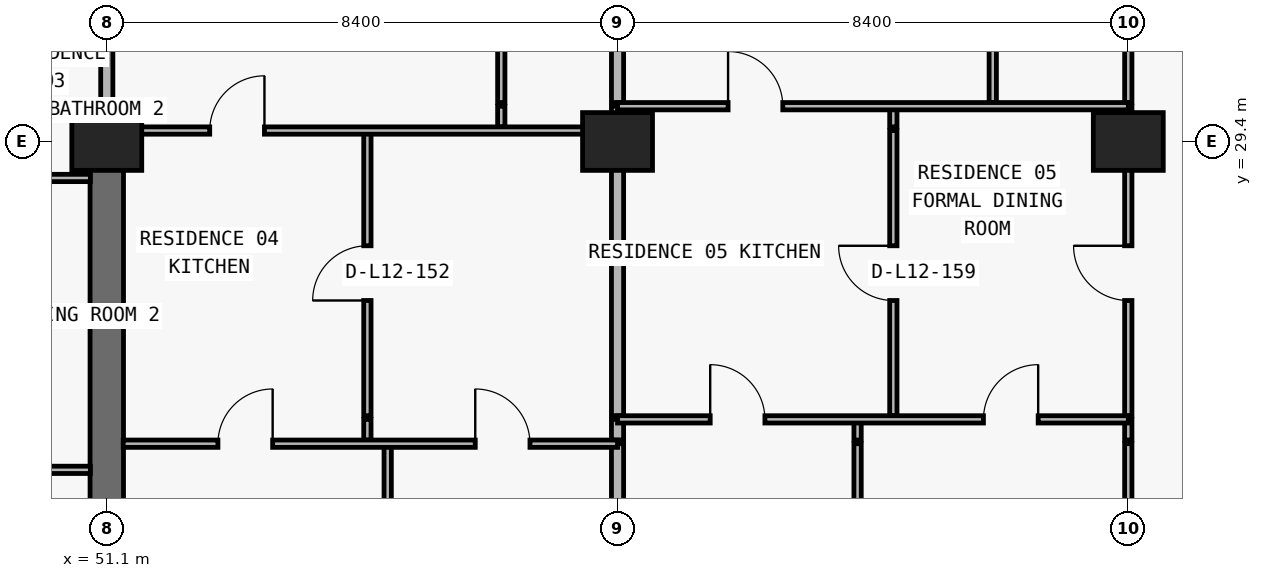
"""IFC4 building model, lengths in metres.
Left out: names, types, materials, properties, quantities, classifications, styles, units other than length and angle.
Written with IfcOpenShell. Run it as: python <this file> out.ifc"""

import sys

from ifc_helpers import new_model, si_unit, direction, frame, frame_2d, origin, origin_2d, place, context, subcontext, project, spatial, rectangle, extrude, element, fill, save


model = new_model("IFC4")
c1 = context("Model", 3, precision=1e-05, world=origin(), true_north=direction((0.0, 1.0)))
c2 = subcontext(c1, "Body", "Model", "MODEL_VIEW")
j1 = project(units=[si_unit("LENGTHUNIT", "METRE"), si_unit("PLANEANGLEUNIT", "RADIAN")], contexts=[c1])
p1 = place(None, origin())
s1 = spatial("IfcSite", under=j1, at=p1, CompositionType="ELEMENT")
p2 = place(p1, origin())
s2 = spatial("IfcBuilding", under=s1, at=p2, CompositionType="ELEMENT")
p3 = place(p2, frame((0.0, 0.0, 49.8)))
s3 = spatial("IfcBuildingStorey", under=s2, at=p3, CompositionType="ELEMENT", Elevation=49.8)
for number, where, z_axis, x_axis in (
    (1, (51.1, 29.4, 0.0), (0.0, 0.0, 1.0), (1.0, 0.0, 0.0)),
    (2, (59.5, 29.4, 0.0), (0.0, 0.0, 1.0), (1.0, 0.0, 0.0)),
    (3, (67.9, 29.4, 0.0), (0.0, 0.0, 1.0), (1.0, 0.0, 0.0)),
):
    element("IfcColumn", number, at=place(p3, frame(where, z_axis=z_axis, x_axis=x_axis)), inside=s3, PredefinedType="COLUMN", context=c2, shape_type="SweptSolid", body=[
        extrude(rectangle(XDim=1.15, YDim=0.95, at=origin_2d()), origin(), (0.0, 0.0, 1.0), 3.05),
    ])
p4 = place(p3, frame((51.1, 20.8, 0.0), z_axis=(0.0, 0.0, 1.0), x_axis=(0.0, 1.0, 0.0)))
e4 = element("IfcWall", 4, at=p4, inside=s3, PredefinedType="SHEAR", context=c2, shape_type="SweptSolid", body=[
    extrude(rectangle(XDim=8.6, YDim=0.55, at=frame_2d((4.3, 0.0))), origin(), (0.0, 0.0, 1.0), 3.05),
])
p5 = place(p3, frame((51.1, 29.64, 0.0), z_axis=(0.0, 0.0, 1.0), x_axis=(0.0, 1.0, 0.0)))
e5 = element("IfcWall", 5, at=p5, inside=s3, PredefinedType="PARTITIONING", context=c2, shape_type="SweptSolid", body=[
    extrude(rectangle(XDim=0.34, YDim=0.2, at=frame_2d((0.17, 0.0))), origin(), (0.0, 0.0, 1.0), 2.335),
])
p6 = place(p3, frame((51.1, 30.04, 0.0), z_axis=(0.0, 0.0, 1.0), x_axis=(0.0, 1.0, 0.0)))
e6 = element("IfcWall", 6, at=p6, inside=s3, PredefinedType="PARTITIONING", context=c2, shape_type="SweptSolid", body=[
    extrude(rectangle(XDim=4.56, YDim=0.2, at=frame_2d((2.28, 0.0))), origin(), (0.0, 0.0, 1.0), 2.335),
])
p7 = place(p3, frame((55.386, 24.49, 0.0), z_axis=(0.0, 0.0, 1.0), x_axis=(0.0, 1.0, 0.0)))
e7 = element("IfcWall", 7, at=p7, inside=s3, PredefinedType="PARTITIONING", context=c2, shape_type="SweptSolid", body=[
    extrude(rectangle(XDim=0.34, YDim=0.12, at=frame_2d((0.17, 0.0))), origin(), (0.0, 0.0, 1.0), 3.05),
])
p8 = place(p3, frame((55.386, 24.89, 0.0), z_axis=(0.0, 0.0, 1.0), x_axis=(0.0, 1.0, 0.0)))
e8 = element("IfcWall", 8, at=p8, inside=s3, PredefinedType="PARTITIONING", context=c2, shape_type="SweptSolid", body=[
    extrude(rectangle(XDim=4.69, YDim=0.12, at=frame_2d((2.345, 0.0))), origin(), (0.0, 0.0, 1.0), 3.05),
])
p9 = place(p8, frame((1.895, 0.0, 0.0)))
e9 = element("IfcOpeningElement", 9, at=p9, cuts=e8, PredefinedType="OPENING", context=c2, shape_type="SweptSolid", body=[
    extrude(rectangle(XDim=0.9, YDim=2.15, at=frame_2d((0.45, 1.075))), frame((0.0, 0.07, 0.0), z_axis=(0.0, -1.0, 0.0), x_axis=(1.0, 0.0, 0.0)), (0.0, 0.0, 1.0), 0.14),
])
p10 = place(p3, frame((55.72, 6.24, 0.0), z_axis=(0.0, 0.0, 1.0), x_axis=(0.0, 1.0, 0.0)))
e10 = element("IfcWall", 10, at=p10, inside=s3, PredefinedType="PARTITIONING", context=c2, shape_type="SweptSolid", body=[
    extrude(rectangle(XDim=18.19, YDim=0.12, at=frame_2d((9.095, 0.0))), origin(), (0.0, 0.0, 1.0), 3.05),
])
p11 = place(p3, frame((57.588, 29.64, 0.0), z_axis=(0.0, 0.0, 1.0), x_axis=(0.0, 1.0, 0.0)))
e11 = element("IfcWall", 11, at=p11, inside=s3, PredefinedType="PARTITIONING", context=c2, shape_type="SweptSolid", body=[
    extrude(rectangle(XDim=0.34, YDim=0.12, at=frame_2d((0.17, 0.0))), origin(), (0.0, 0.0, 1.0), 3.05),
])
p12 = place(p3, frame((57.588, 30.04, 0.0), z_axis=(0.0, 0.0, 1.0), x_axis=(0.0, 1.0, 0.0)))
e12 = element("IfcWall", 12, at=p12, inside=s3, PredefinedType="PARTITIONING", context=c2, shape_type="SweptSolid", body=[
    extrude(rectangle(XDim=4.56, YDim=0.12, at=frame_2d((2.28, 0.0))), origin(), (0.0, 0.0, 1.0), 3.05),
])
p13 = place(p12, frame((1.855, 0.0, 0.0)))
e13 = element("IfcOpeningElement", 13, at=p13, cuts=e12, PredefinedType="OPENING", context=c2, shape_type="SweptSolid", body=[
    extrude(rectangle(XDim=0.85, YDim=2.1, at=frame_2d((0.425, 1.05))), frame((0.0, 0.07, 0.0), z_axis=(0.0, -1.0, 0.0), x_axis=(1.0, 0.0, 0.0)), (0.0, 0.0, 1.0), 0.14),
])
p14 = place(p3, frame((59.5, 6.24, 0.0), z_axis=(0.0, 0.0, 1.0), x_axis=(0.0, 1.0, 0.0)))
e14 = element("IfcWall", 14, at=p14, inside=s3, PredefinedType="PARTITIONING", context=c2, shape_type="SweptSolid", body=[
    extrude(rectangle(XDim=18.19, YDim=0.2, at=frame_2d((9.095, 0.0))), origin(), (0.0, 0.0, 1.0), 2.11),
])
p15 = place(p3, frame((59.5, 24.49, 0.0), z_axis=(0.0, 0.0, 1.0), x_axis=(0.0, 1.0, 0.0)))
e15 = element("IfcWall", 15, at=p15, inside=s3, PredefinedType="PARTITIONING", context=c2, shape_type="SweptSolid", body=[
    extrude(rectangle(XDim=0.34, YDim=0.2, at=frame_2d((0.17, 0.0))), origin(), (0.0, 0.0, 1.0), 2.11),
])
p16 = place(p3, frame((59.5, 24.89, 0.0), z_axis=(0.0, 0.0, 1.0), x_axis=(0.0, 1.0, 0.0)))
e16 = element("IfcWall", 16, at=p16, inside=s3, PredefinedType="PARTITIONING", context=c2, shape_type="SweptSolid", body=[
    extrude(rectangle(XDim=4.69, YDim=0.2, at=frame_2d((2.345, 0.0))), origin(), (0.0, 0.0, 1.0), 2.11),
])
p17 = place(p3, frame((59.5, 29.64, 0.0), z_axis=(0.0, 0.0, 1.0), x_axis=(0.0, 1.0, 0.0)))
e17 = element("IfcWall", 17, at=p17, inside=s3, PredefinedType="PARTITIONING", context=c2, shape_type="SweptSolid", body=[
    extrude(rectangle(XDim=0.34, YDim=0.2, at=frame_2d((0.17, 0.0))), origin(), (0.0, 0.0, 1.0), 2.11),
])
p18 = place(p3, frame((59.5, 30.04, 0.0), z_axis=(0.0, 0.0, 1.0), x_axis=(0.0, 1.0, 0.0)))
e18 = element("IfcWall", 18, at=p18, inside=s3, PredefinedType="PARTITIONING", context=c2, shape_type="SweptSolid", body=[
    extrude(rectangle(XDim=4.56, YDim=0.2, at=frame_2d((2.28, 0.0))), origin(), (0.0, 0.0, 1.0), 2.11),
])
p19 = place(p3, frame((63.448, 6.24, 0.0), z_axis=(0.0, 0.0, 1.0), x_axis=(0.0, 1.0, 0.0)))
e19 = element("IfcWall", 19, at=p19, inside=s3, PredefinedType="PARTITIONING", context=c2, shape_type="SweptSolid", body=[
    extrude(rectangle(XDim=18.19, YDim=0.12, at=frame_2d((9.095, 0.0))), origin(), (0.0, 0.0, 1.0), 3.05),
])
p20 = place(p3, frame((63.448, 24.49, 0.0), z_axis=(0.0, 0.0, 1.0), x_axis=(0.0, 1.0, 0.0)))
e20 = element("IfcWall", 20, at=p20, inside=s3, PredefinedType="PARTITIONING", context=c2, shape_type="SweptSolid", body=[
    extrude(rectangle(XDim=0.34, YDim=0.12, at=frame_2d((0.17, 0.0))), origin(), (0.0, 0.0, 1.0), 3.05),
])
p21 = place(p3, frame((64.036, 24.89, 0.0), z_axis=(0.0, 0.0, 1.0), x_axis=(0.0, 1.0, 0.0)))
e21 = element("IfcWall", 21, at=p21, inside=s3, PredefinedType="PARTITIONING", context=c2, shape_type="SweptSolid", body=[
    extrude(rectangle(XDim=4.69, YDim=0.12, at=frame_2d((2.345, 0.0))), origin(), (0.0, 0.0, 1.0), 3.05),
])
p22 = place(p21, frame((1.895, 0.0, 0.0)))
e22 = element("IfcOpeningElement", 22, at=p22, cuts=e21, PredefinedType="OPENING", context=c2, shape_type="SweptSolid", body=[
    extrude(rectangle(XDim=0.9, YDim=2.15, at=frame_2d((0.45, 1.075))), frame((0.0, 0.07, 0.0), z_axis=(0.0, -1.0, 0.0), x_axis=(1.0, 0.0, 0.0)), (0.0, 0.0, 1.0), 0.14),
])
p23 = place(p3, frame((64.036, 29.64, 0.0), z_axis=(0.0, 0.0, 1.0), x_axis=(0.0, 1.0, 0.0)))
e23 = element("IfcWall", 23, at=p23, inside=s3, PredefinedType="PARTITIONING", context=c2, shape_type="SweptSolid", body=[
    extrude(rectangle(XDim=0.34, YDim=0.12, at=frame_2d((0.17, 0.0))), origin(), (0.0, 0.0, 1.0), 3.05),
])
p24 = place(p3, frame((65.671, 30.04, 0.0), z_axis=(0.0, 0.0, 1.0), x_axis=(0.0, 1.0, 0.0)))
e24 = element("IfcWall", 24, at=p24, inside=s3, PredefinedType="PARTITIONING", context=c2, shape_type="SweptSolid", body=[
    extrude(rectangle(XDim=4.56, YDim=0.12, at=frame_2d((2.28, 0.0))), origin(), (0.0, 0.0, 1.0), 3.05),
])
p25 = place(p24, frame((1.855, 0.0, 0.0)))
e25 = element("IfcOpeningElement", 25, at=p25, cuts=e24, PredefinedType="OPENING", context=c2, shape_type="SweptSolid", body=[
    extrude(rectangle(XDim=0.85, YDim=2.1, at=frame_2d((0.425, 1.05))), frame((0.0, 0.07, 0.0), z_axis=(0.0, -1.0, 0.0), x_axis=(1.0, 0.0, 0.0)), (0.0, 0.0, 1.0), 0.14),
])
p26 = place(p3, frame((67.9, 6.24, 0.0), z_axis=(0.0, 0.0, 1.0), x_axis=(0.0, 1.0, 0.0)))
e26 = element("IfcWall", 26, at=p26, inside=s3, PredefinedType="PARTITIONING", context=c2, shape_type="SweptSolid", body=[
    extrude(rectangle(XDim=18.19, YDim=0.12, at=frame_2d((9.095, 0.0))), origin(), (0.0, 0.0, 1.0), 2.11),
])
p27 = place(p3, frame((67.9, 24.49, 0.0), z_axis=(0.0, 0.0, 1.0), x_axis=(0.0, 1.0, 0.0)))
e27 = element("IfcWall", 27, at=p27, inside=s3, PredefinedType="PARTITIONING", context=c2, shape_type="SweptSolid", body=[
    extrude(rectangle(XDim=0.34, YDim=0.12, at=frame_2d((0.17, 0.0))), origin(), (0.0, 0.0, 1.0), 2.11),
])
p28 = place(p3, frame((67.9, 24.89, 0.0), z_axis=(0.0, 0.0, 1.0), x_axis=(0.0, 1.0, 0.0)))
e28 = element("IfcWall", 28, at=p28, inside=s3, PredefinedType="PARTITIONING", context=c2, shape_type="SweptSolid", body=[
    extrude(rectangle(XDim=4.69, YDim=0.12, at=frame_2d((2.345, 0.0))), origin(), (0.0, 0.0, 1.0), 2.11),
])
p29 = place(p28, frame((1.895, 0.0, 0.0)))
e29 = element("IfcOpeningElement", 29, at=p29, cuts=e28, PredefinedType="OPENING", context=c2, shape_type="SweptSolid", body=[
    extrude(rectangle(XDim=0.9, YDim=2.06, at=frame_2d((0.45, 1.03))), frame((0.0, 0.07, 0.0), z_axis=(0.0, -1.0, 0.0), x_axis=(1.0, 0.0, 0.0)), (0.0, 0.0, 1.0), 0.14),
])
p30 = place(p3, frame((67.9, 29.64, 0.0), z_axis=(0.0, 0.0, 1.0), x_axis=(0.0, 1.0, 0.0)))
e30 = element("IfcWall", 30, at=p30, inside=s3, PredefinedType="PARTITIONING", context=c2, shape_type="SweptSolid", body=[
    extrude(rectangle(XDim=0.34, YDim=0.12, at=frame_2d((0.17, 0.0))), origin(), (0.0, 0.0, 1.0), 2.11),
])
p31 = place(p3, frame((67.9, 30.04, 0.0), z_axis=(0.0, 0.0, 1.0), x_axis=(0.0, 1.0, 0.0)))
e31 = element("IfcWall", 31, at=p31, inside=s3, PredefinedType="PARTITIONING", context=c2, shape_type="SweptSolid", body=[
    extrude(rectangle(XDim=4.56, YDim=0.12, at=frame_2d((2.28, 0.0))), origin(), (0.0, 0.0, 1.0), 2.11),
])
p32 = place(p3, frame((42.7, 24.0, 0.0), z_axis=(0.0, 0.0, 1.0), x_axis=(1.0, 0.0, 0.0)))
e32 = element("IfcWall", 32, at=p32, inside=s3, PredefinedType="PARTITIONING", context=c2, shape_type="SweptSolid", body=[
    extrude(rectangle(XDim=8.13, YDim=0.12, at=frame_2d((4.065, 0.0))), origin(), (0.0, 0.0, 1.0), 3.05),
])
p33 = place(p32, frame((3.615, 0.0, 0.0)))
e33 = element("IfcOpeningElement", 33, at=p33, cuts=e32, PredefinedType="OPENING", context=c2, shape_type="SweptSolid", body=[
    extrude(rectangle(XDim=0.9, YDim=2.15, at=frame_2d((0.45, 1.075))), frame((0.0, 0.07, 0.0), z_axis=(0.0, -1.0, 0.0), x_axis=(1.0, 0.0, 0.0)), (0.0, 0.0, 1.0), 0.14),
])
p34 = place(p3, frame((51.37, 24.43, 0.0), z_axis=(0.0, 0.0, 1.0), x_axis=(1.0, 0.0, 0.0)))
e34 = element("IfcWall", 34, at=p34, inside=s3, PredefinedType="PARTITIONING", context=c2, shape_type="SweptSolid", body=[
    extrude(rectangle(XDim=8.13, YDim=0.12, at=frame_2d((4.065, 0.0))), origin(), (0.0, 0.0, 1.0), 3.05),
])
p35 = place(p34, frame((1.558, 0.0, 0.0)))
e35 = element("IfcOpeningElement", 35, at=p35, cuts=e34, PredefinedType="OPENING", context=c2, shape_type="SweptSolid", body=[
    extrude(rectangle(XDim=0.9, YDim=2.15, at=frame_2d((0.45, 1.075))), frame((0.0, 0.07, 0.0), z_axis=(0.0, -1.0, 0.0), x_axis=(1.0, 0.0, 0.0)), (0.0, 0.0, 1.0), 0.14),
])
p36 = place(p34, frame((5.79, 0.0, 0.0)))
e36 = element("IfcOpeningElement", 36, at=p36, cuts=e34, PredefinedType="OPENING", context=c2, shape_type="SweptSolid", body=[
    extrude(rectangle(XDim=0.9, YDim=2.15, at=frame_2d((0.45, 1.075))), frame((0.0, 0.07, 0.0), z_axis=(0.0, -1.0, 0.0), x_axis=(1.0, 0.0, 0.0)), (0.0, 0.0, 1.0), 0.14),
])
p37 = place(p3, frame((59.5, 24.83, 0.0), z_axis=(0.0, 0.0, 1.0), x_axis=(1.0, 0.0, 0.0)))
e37 = element("IfcWall", 37, at=p37, inside=s3, PredefinedType="PARTITIONING", context=c2, shape_type="SweptSolid", body=[
    extrude(rectangle(XDim=8.4, YDim=0.12, at=frame_2d((4.2, 0.0))), origin(), (0.0, 0.0, 1.0), 3.05),
])
p38 = place(p37, frame((1.524, 0.0, 0.0)))
e38 = element("IfcOpeningElement", 38, at=p38, cuts=e37, PredefinedType="OPENING", context=c2, shape_type="SweptSolid", body=[
    extrude(rectangle(XDim=0.9, YDim=2.15, at=frame_2d((0.45, 1.075))), frame((0.0, 0.07, 0.0), z_axis=(0.0, -1.0, 0.0), x_axis=(1.0, 0.0, 0.0)), (0.0, 0.0, 1.0), 0.14),
])
p39 = place(p37, frame((6.018, 0.0, 0.0)))
e39 = element("IfcOpeningElement", 39, at=p39, cuts=e37, PredefinedType="OPENING", context=c2, shape_type="SweptSolid", body=[
    extrude(rectangle(XDim=0.9, YDim=2.15, at=frame_2d((0.45, 1.075))), frame((0.0, 0.07, 0.0), z_axis=(0.0, -1.0, 0.0), x_axis=(1.0, 0.0, 0.0)), (0.0, 0.0, 1.0), 0.14),
])
p40 = place(p3, frame((42.705, 28.8, 0.0), z_axis=(0.0, 0.0, 1.0), x_axis=(1.0, 0.0, 0.0)))
e40 = element("IfcWall", 40, at=p40, inside=s3, PredefinedType="PARTITIONING", context=c2, shape_type="SweptSolid", body=[
    extrude(rectangle(XDim=8.125, YDim=0.12, at=frame_2d((4.062, 0.0))), origin(), (0.0, 0.0, 1.0), 3.05),
])
p41 = place(p40, frame((2.877, 0.0, 0.0)))
e41 = element("IfcOpeningElement", 41, at=p41, cuts=e40, PredefinedType="OPENING", context=c2, shape_type="SweptSolid", body=[
    extrude(rectangle(XDim=0.9, YDim=2.15, at=frame_2d((0.45, 1.075))), frame((0.0, 0.07, 0.0), z_axis=(0.0, -1.0, 0.0), x_axis=(1.0, 0.0, 0.0)), (0.0, 0.0, 1.0), 0.14),
])
p42 = place(p3, frame((51.1, 29.58, 0.0), z_axis=(0.0, 0.0, 1.0), x_axis=(1.0, 0.0, 0.0)))
e42 = element("IfcWall", 42, at=p42, inside=s3, PredefinedType="PARTITIONING", context=c2, shape_type="SweptSolid", body=[
    extrude(rectangle(XDim=8.4, YDim=0.12, at=frame_2d((4.2, 0.0))), origin(), (0.0, 0.0, 1.0), 2.11),
])
p43 = place(p42, frame((1.693, 0.0, 0.0)))
e43 = element("IfcOpeningElement", 43, at=p43, cuts=e42, PredefinedType="OPENING", context=c2, shape_type="SweptSolid", body=[
    extrude(rectangle(XDim=0.9, YDim=2.06, at=frame_2d((0.45, 1.03))), frame((0.0, 0.07, 0.0), z_axis=(0.0, -1.0, 0.0), x_axis=(1.0, 0.0, 0.0)), (0.0, 0.0, 1.0), 0.14),
])
p44 = place(p3, frame((59.5, 29.98, 0.0), z_axis=(0.0, 0.0, 1.0), x_axis=(1.0, 0.0, 0.0)))
e44 = element("IfcWall", 44, at=p44, inside=s3, PredefinedType="PARTITIONING", context=c2, shape_type="SweptSolid", body=[
    extrude(rectangle(XDim=8.4, YDim=0.12, at=frame_2d((4.2, 0.0))), origin(), (0.0, 0.0, 1.0), 3.05),
])
p45 = place(p44, frame((1.818, 0.0, 0.0)))
e45 = element("IfcOpeningElement", 45, at=p45, cuts=e44, PredefinedType="OPENING", context=c2, shape_type="SweptSolid", body=[
    extrude(rectangle(XDim=0.9, YDim=2.15, at=frame_2d((0.45, 1.075))), frame((0.0, 0.07, 0.0), z_axis=(0.0, -1.0, 0.0), x_axis=(1.0, 0.0, 0.0)), (0.0, 0.0, 1.0), 0.14),
])
p46 = place(p43, origin())
e46 = element("IfcDoor", 46, at=p46, inside=s3, OperationType="SINGLE_SWING_RIGHT", PredefinedType="DOOR", context=c2, shape_type="SweptSolid", body=[
    extrude(rectangle(XDim=0.9, YDim=2.06, at=frame_2d((0.45, 1.03))), frame((0.0, 0.025, 0.0), z_axis=(0.0, -1.0, 0.0), x_axis=(1.0, 0.0, 0.0)), (0.0, 0.0, 1.0), 0.05),
])
fill(e43, e46)
p47 = place(p9, origin())
e47 = element("IfcDoor", 47, at=p47, inside=s3, OperationType="SINGLE_SWING_LEFT", PredefinedType="DOOR", context=c2, shape_type="SweptSolid", body=[
    extrude(rectangle(XDim=0.9, YDim=2.15, at=frame_2d((0.45, 1.075))), frame((0.0, 0.025, 0.0), z_axis=(0.0, -1.0, 0.0), x_axis=(1.0, 0.0, 0.0)), (0.0, 0.0, 1.0), 0.05),
])
fill(e9, e47)
p48 = place(p35, origin())
e48 = element("IfcDoor", 48, at=p48, inside=s3, OperationType="SINGLE_SWING_RIGHT", PredefinedType="DOOR", context=c2, shape_type="SweptSolid", body=[
    extrude(rectangle(XDim=0.9, YDim=2.15, at=frame_2d((0.45, 1.075))), frame((0.0, 0.025, 0.0), z_axis=(0.0, -1.0, 0.0), x_axis=(1.0, 0.0, 0.0)), (0.0, 0.0, 1.0), 0.05),
])
fill(e35, e48)
p49 = place(p36, origin())
e49 = element("IfcDoor", 49, at=p49, inside=s3, OperationType="SINGLE_SWING_LEFT", PredefinedType="DOOR", context=c2, shape_type="SweptSolid", body=[
    extrude(rectangle(XDim=0.9, YDim=2.15, at=frame_2d((0.45, 1.075))), frame((0.0, 0.025, 0.0), z_axis=(0.0, -1.0, 0.0), x_axis=(1.0, 0.0, 0.0)), (0.0, 0.0, 1.0), 0.05),
])
fill(e36, e49)
p50 = place(p45, origin())
e50 = element("IfcDoor", 50, at=p50, inside=s3, OperationType="SINGLE_SWING_LEFT", PredefinedType="DOOR", context=c2, shape_type="SweptSolid", body=[
    extrude(rectangle(XDim=0.9, YDim=2.15, at=frame_2d((0.45, 1.075))), frame((0.0, 0.025, 0.0), z_axis=(0.0, -1.0, 0.0), x_axis=(1.0, 0.0, 0.0)), (0.0, 0.0, 1.0), 0.05),
])
fill(e45, e50)
p51 = place(p22, origin())
e51 = element("IfcDoor", 51, at=p51, inside=s3, OperationType="SINGLE_SWING_RIGHT", PredefinedType="DOOR", context=c2, shape_type="SweptSolid", body=[
    extrude(rectangle(XDim=0.9, YDim=2.15, at=frame_2d((0.45, 1.075))), frame((0.0, 0.025, 0.0), z_axis=(0.0, -1.0, 0.0), x_axis=(1.0, 0.0, 0.0)), (0.0, 0.0, 1.0), 0.05),
])
fill(e22, e51)
p52 = place(p38, origin())
e52 = element("IfcDoor", 52, at=p52, inside=s3, OperationType="SINGLE_SWING_LEFT", PredefinedType="DOOR", context=c2, shape_type="SweptSolid", body=[
    extrude(rectangle(XDim=0.9, YDim=2.15, at=frame_2d((0.45, 1.075))), frame((0.0, 0.025, 0.0), z_axis=(0.0, -1.0, 0.0), x_axis=(1.0, 0.0, 0.0)), (0.0, 0.0, 1.0), 0.05),
])
fill(e38, e52)
p53 = place(p39, origin())
e53 = element("IfcDoor", 53, at=p53, inside=s3, OperationType="SINGLE_SWING_RIGHT", PredefinedType="DOOR", context=c2, shape_type="SweptSolid", body=[
    extrude(rectangle(XDim=0.9, YDim=2.15, at=frame_2d((0.45, 1.075))), frame((0.0, 0.025, 0.0), z_axis=(0.0, -1.0, 0.0), x_axis=(1.0, 0.0, 0.0)), (0.0, 0.0, 1.0), 0.05),
])
fill(e39, e53)
p54 = place(p29, origin())
e54 = element("IfcDoor", 54, at=p54, inside=s3, OperationType="SINGLE_SWING_RIGHT", PredefinedType="DOOR", context=c2, shape_type="SweptSolid", body=[
    extrude(rectangle(XDim=0.9, YDim=2.06, at=frame_2d((0.45, 1.03))), frame((0.0, 0.025, 0.0), z_axis=(0.0, -1.0, 0.0), x_axis=(1.0, 0.0, 0.0)), (0.0, 0.0, 1.0), 0.05),
])
fill(e29, e54)
save(model, sys.argv[1])
